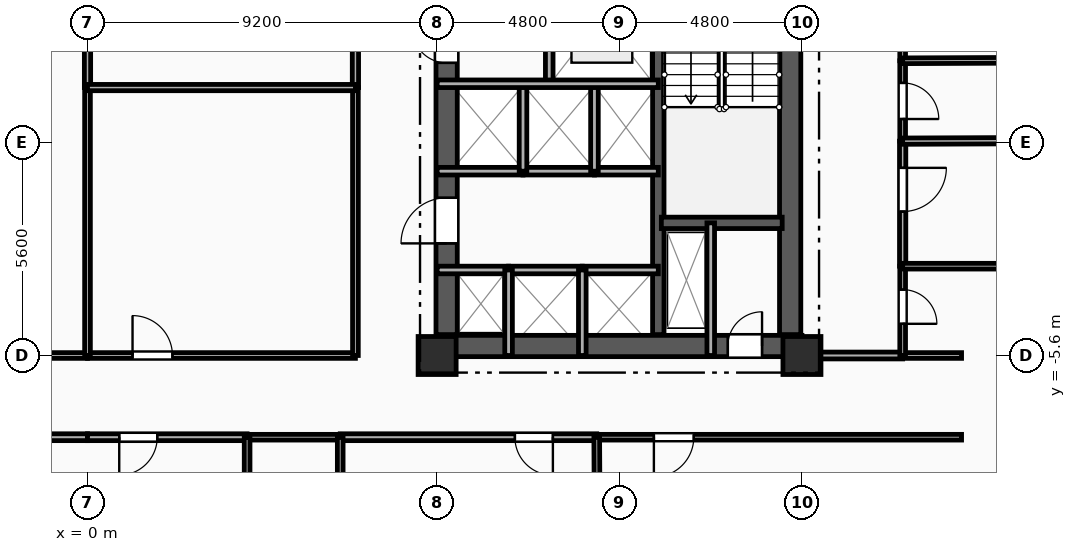
"""IFC4 building model, lengths in metres.
Left out: names, types, materials, properties, quantities, classifications, styles, units other than length and angle.
Written with IfcOpenShell. Run it as: python <this file> out.ifc"""

import sys

from ifc_helpers import new_model, si_unit, direction, frame, frame_2d, origin, origin_2d, place, context, subcontext, project, spatial, rectangle, extrude, element, fill, save


model = new_model("IFC4")
c1 = context("Model", 3, precision=1e-05, world=origin(), true_north=direction((0.0, 1.0)))
c2 = subcontext(c1, "Body", "Model", "MODEL_VIEW")
j1 = project(units=[si_unit("LENGTHUNIT", "METRE"), si_unit("PLANEANGLEUNIT", "RADIAN")], contexts=[c1])
p1 = place(None, origin())
s1 = spatial("IfcSite", under=j1, at=p1, CompositionType="ELEMENT")
p2 = place(p1, origin())
s2 = spatial("IfcBuilding", under=s1, at=p2, CompositionType="ELEMENT")
p3 = place(p2, frame((0.0, 0.0, 82.35)))
s3 = spatial("IfcBuildingStorey", under=s2, at=p3, CompositionType="ELEMENT", Elevation=82.35)
for number, where, z_axis, x_axis in (
    (1, (9.2, -5.6, 0.0), (0.0, 0.0, 1.0), (1.0, 0.0, 0.0)),
    (2, (18.8, -5.6, 0.0), (0.0, 0.0, 1.0), (1.0, 0.0, 0.0)),
):
    element("IfcColumn", number, at=place(p3, frame(where, z_axis=z_axis, x_axis=x_axis)), inside=s3, PredefinedType="COLUMN", context=c2, shape_type="SweptSolid", body=[
        extrude(rectangle(XDim=1.0, YDim=1.0, at=origin_2d()), origin(), (0.0, 0.0, 1.0), 3.35),
    ])
p4 = place(p3, frame((9.2, -5.35, 0.0), z_axis=(0.0, 0.0, 1.0), x_axis=(1.0, 0.0, 0.0)))
e3 = element("IfcWall", 3, at=p4, inside=s3, PredefinedType="SHEAR", context=c2, shape_type="SweptSolid", body=[
    extrude(rectangle(XDim=9.6, YDim=0.56, at=frame_2d((4.8, 0.0))), origin(), (0.0, 0.0, 1.0), 3.045),
])
p5 = place(p4, frame((7.65, 0.0, 0.0)))
e4 = element("IfcOpeningElement", 4, at=p5, cuts=e3, PredefinedType="OPENING", context=c2, shape_type="SweptSolid", body=[
    extrude(rectangle(XDim=0.9, YDim=2.1, at=frame_2d((0.45, 1.05))), frame((0.0, 0.29, 0.0), z_axis=(0.0, -1.0, 0.0), x_axis=(1.0, 0.0, 0.0)), (0.0, 0.0, 1.0), 0.58),
])
p6 = place(p3, frame((9.45, -5.05, 0.0), z_axis=(0.0, 0.0, 1.0), x_axis=(0.0, 1.0, 0.0)))
e5 = element("IfcWall", 5, at=p6, inside=s3, PredefinedType="SHEAR", context=c2, shape_type="SweptSolid", body=[
    extrude(rectangle(XDim=10.1, YDim=0.56, at=frame_2d((5.05, 0.0))), origin(), (0.0, 0.0, 1.0), 3.045),
])
p7 = place(p6, frame((7.15, 0.0, 0.0)))
e6 = element("IfcOpeningElement", 6, at=p7, cuts=e5, PredefinedType="OPENING", context=c2, shape_type="SweptSolid", body=[
    extrude(rectangle(XDim=0.9, YDim=2.1, at=frame_2d((0.45, 1.05))), frame((0.0, 0.29, 0.0), z_axis=(0.0, -1.0, 0.0), x_axis=(1.0, 0.0, 0.0)), (0.0, 0.0, 1.0), 0.58),
])
p8 = place(p6, frame((2.4, 0.0, 0.0)))
e7 = element("IfcOpeningElement", 7, at=p8, cuts=e5, PredefinedType="OPENING", context=c2, shape_type="SweptSolid", body=[
    extrude(rectangle(XDim=1.2, YDim=2.15, at=frame_2d((0.6, 1.075))), frame((0.0, 0.29, 0.0), z_axis=(0.0, -1.0, 0.0), x_axis=(1.0, 0.0, 0.0)), (0.0, 0.0, 1.0), 0.58),
])
p9 = place(p3, frame((18.49, -5.05, 0.0), z_axis=(0.0, 0.0, 1.0), x_axis=(0.0, 1.0, 0.0)))
e8 = element("IfcWall", 8, at=p9, inside=s3, PredefinedType="SHEAR", context=c2, shape_type="SweptSolid", body=[
    extrude(rectangle(XDim=10.1, YDim=0.56, at=frame_2d((5.05, 0.0))), origin(), (0.0, 0.0, 1.0), 3.045),
])
p10 = place(p3, frame((15.02, -5.05, 0.0), z_axis=(0.0, 0.0, 1.0), x_axis=(0.0, 1.0, 0.0)))
e9 = element("IfcWall", 9, at=p10, inside=s3, PredefinedType="SHEAR", context=c2, shape_type="SweptSolid", body=[
    extrude(rectangle(XDim=10.1, YDim=0.3, at=frame_2d((5.05, 0.0))), origin(), (0.0, 0.0, 1.0), 3.045),
])
p11 = place(p3, frame((15.1, -2.11, 0.0), z_axis=(0.0, 0.0, 1.0), x_axis=(1.0, 0.0, 0.0)))
e10 = element("IfcWall", 10, at=p11, inside=s3, PredefinedType="SHEAR", context=c2, shape_type="SweptSolid", body=[
    extrude(rectangle(XDim=3.18, YDim=0.3, at=frame_2d((1.59, 0.0))), origin(), (0.0, 0.0, 1.0), 3.045),
])
p12 = place(p3, frame((16.4, -2.11, 0.0), z_axis=(0.0, 0.0, 1.0), x_axis=(0.0, -1.0, 0.0)))
e11 = element("IfcWall", 11, at=p12, inside=s3, PredefinedType="PARTITIONING", context=c2, shape_type="SweptSolid", body=[
    extrude(rectangle(XDim=3.49, YDim=0.2, at=frame_2d((1.745, 0.0))), origin(), (0.0, 0.0, 1.0), 3.045),
])
p13 = place(p3, frame((12.15, 5.6, 0.0), z_axis=(0.0, 0.0, 1.0), x_axis=(0.0, -1.0, 0.0)))
e12 = element("IfcWall", 12, at=p13, inside=s3, PredefinedType="PARTITIONING", context=c2, shape_type="SweptSolid", body=[
    extrude(rectangle(XDim=4.05, YDim=0.2, at=frame_2d((2.025, 0.0))), origin(), (0.0, 0.0, 1.0), 3.045),
])
p14 = place(p3, frame((9.2, -3.35, 0.0), z_axis=(0.0, 0.0, 1.0), x_axis=(1.0, 0.0, 0.0)))
e13 = element("IfcWall", 13, at=p14, inside=s3, PredefinedType="PARTITIONING", context=c2, shape_type="SweptSolid", body=[
    extrude(rectangle(XDim=1.88, YDim=0.2, at=frame_2d((0.94, 0.0))), origin(), (0.0, 0.0, 1.0), 2.76),
])
p15 = place(p3, frame((11.08, -3.35, 0.0), z_axis=(0.0, 0.0, 1.0), x_axis=(1.0, 0.0, 0.0)))
e14 = element("IfcWall", 14, at=p15, inside=s3, PredefinedType="PARTITIONING", context=c2, shape_type="SweptSolid", body=[
    extrude(rectangle(XDim=1.94, YDim=0.2, at=frame_2d((0.97, 0.0))), origin(), (0.0, 0.0, 1.0), 3.045),
])
p16 = place(p3, frame((13.02, -3.35, 0.0), z_axis=(0.0, 0.0, 1.0), x_axis=(1.0, 0.0, 0.0)))
e15 = element("IfcWall", 15, at=p16, inside=s3, PredefinedType="PARTITIONING", context=c2, shape_type="SweptSolid", body=[
    extrude(rectangle(XDim=2.0, YDim=0.2, at=frame_2d((1.0, 0.0))), origin(), (0.0, 0.0, 1.0), 3.045),
])
p17 = place(p3, frame((11.46, -0.75, 0.0), z_axis=(0.0, 0.0, 1.0), x_axis=(-1.0, 0.0, 0.0)))
e16 = element("IfcWall", 16, at=p17, inside=s3, PredefinedType="PARTITIONING", context=c2, shape_type="SweptSolid", body=[
    extrude(rectangle(XDim=2.26, YDim=0.2, at=frame_2d((1.13, 0.0))), origin(), (0.0, 0.0, 1.0), 3.045),
])
p18 = place(p3, frame((13.34, -0.75, 0.0), z_axis=(0.0, 0.0, 1.0), x_axis=(-1.0, 0.0, 0.0)))
e17 = element("IfcWall", 17, at=p18, inside=s3, PredefinedType="PARTITIONING", context=c2, shape_type="SweptSolid", body=[
    extrude(rectangle(XDim=1.88, YDim=0.2, at=frame_2d((0.94, 0.0))), origin(), (0.0, 0.0, 1.0), 3.045),
])
p19 = place(p3, frame((15.02, -0.75, 0.0), z_axis=(0.0, 0.0, 1.0), x_axis=(-1.0, 0.0, 0.0)))
e18 = element("IfcWall", 18, at=p19, inside=s3, PredefinedType="PARTITIONING", context=c2, shape_type="SweptSolid", body=[
    extrude(rectangle(XDim=1.68, YDim=0.2, at=frame_2d((0.84, 0.0))), origin(), (0.0, 0.0, 1.0), 3.045),
])
for number, where, z_axis, x_axis in (
    (19, (11.08, -5.6, 0.0), (0.0, 0.0, 1.0), (0.0, 1.0, 0.0)),
    (20, (13.02, -5.6, 0.0), (0.0, 0.0, 1.0), (0.0, 1.0, 0.0)),
):
    element("IfcWall", number, at=place(p3, frame(where, z_axis=z_axis, x_axis=x_axis)), inside=s3, PredefinedType="PARTITIONING", context=c2, shape_type="SweptSolid", body=[
        extrude(rectangle(XDim=2.25, YDim=0.2, at=frame_2d((1.125, 0.0))), origin(), (0.0, 0.0, 1.0), 3.045),
    ])
for number, where, z_axis, x_axis in (
    (21, (11.46, -0.75, 0.0), (0.0, 0.0, 1.0), (0.0, 1.0, 0.0)),
    (22, (13.34, -0.75, 0.0), (0.0, 0.0, 1.0), (0.0, 1.0, 0.0)),
):
    element("IfcWall", number, at=place(p3, frame(where, z_axis=z_axis, x_axis=x_axis)), inside=s3, PredefinedType="PARTITIONING", context=c2, shape_type="SweptSolid", body=[
        extrude(rectangle(XDim=2.3, YDim=0.2, at=frame_2d((1.15, 0.0))), origin(), (0.0, 0.0, 1.0), 3.045),
    ])
p20 = place(p3, frame((0.0, -7.75, 0.0), z_axis=(0.0, 0.0, 1.0), x_axis=(-1.0, 0.0, 0.0)))
e23 = element("IfcWall", 23, at=p20, inside=s3, PredefinedType="PARTITIONING", context=c2, shape_type="SweptSolid", body=[
    extrude(rectangle(XDim=2.55, YDim=0.18, at=frame_2d((1.275, 0.0))), origin(), (0.0, 0.0, 1.0), 3.045),
])
p21 = place(p3, frame((-7.05, -5.6, 0.0), z_axis=(0.0, 0.0, 1.0), x_axis=(1.0, 0.0, 0.0)))
e24 = element("IfcWall", 24, at=p21, inside=s3, PredefinedType="PARTITIONING", context=c2, shape_type="SweptSolid", body=[
    extrude(rectangle(XDim=7.05, YDim=0.15, at=frame_2d((3.525, 0.0))), origin(), (0.0, 0.0, 1.0), 2.53),
])
p22 = place(p3, frame((18.8, -5.6, 0.0), z_axis=(0.0, 0.0, 1.0), x_axis=(1.0, 0.0, 0.0)))
e25 = element("IfcWall", 25, at=p22, inside=s3, PredefinedType="PARTITIONING", context=c2, shape_type="SweptSolid", body=[
    extrude(rectangle(XDim=2.65, YDim=0.18, at=frame_2d((1.325, 0.0))), origin(), (0.0, 0.0, 1.0), 2.53),
])
p23 = place(p3, frame((21.45, -5.6, 0.0), z_axis=(0.0, 0.0, 1.0), x_axis=(1.0, 0.0, 0.0)))
e26 = element("IfcWall", 26, at=p23, inside=s3, PredefinedType="PLUMBINGWALL", context=c2, shape_type="SweptSolid", body=[
    extrude(rectangle(XDim=1.55, YDim=0.15, at=frame_2d((0.775, 0.0))), origin(), (0.0, 0.0, 1.0), 3.045),
])
p24 = place(p3, frame((4.2, -7.75, 0.0), z_axis=(0.0, 0.0, 1.0), x_axis=(-1.0, 0.0, 0.0)))
e27 = element("IfcWall", 27, at=p24, inside=s3, PredefinedType="PARTITIONING", context=c2, shape_type="SweptSolid", body=[
    extrude(rectangle(XDim=4.2, YDim=0.18, at=frame_2d((2.1, 0.0))), origin(), (0.0, 0.0, 1.0), 3.045),
])
p25 = place(p24, frame((2.365, 0.0, 0.0)))
e28 = element("IfcOpeningElement", 28, at=p25, cuts=e27, PredefinedType="OPENING", context=c2, shape_type="SweptSolid", body=[
    extrude(rectangle(XDim=1.0, YDim=2.15, at=frame_2d((0.5, 1.075))), frame((0.0, 0.1, 0.0), z_axis=(0.0, -1.0, 0.0), x_axis=(1.0, 0.0, 0.0)), (0.0, 0.0, 1.0), 0.2),
])
p26 = place(p3, frame((13.4, -7.75, 0.0), z_axis=(0.0, 0.0, 1.0), x_axis=(-1.0, 0.0, 0.0)))
e29 = element("IfcWall", 29, at=p26, inside=s3, PredefinedType="PARTITIONING", context=c2, shape_type="SweptSolid", body=[
    extrude(rectangle(XDim=6.75, YDim=0.18, at=frame_2d((3.375, 0.0))), origin(), (0.0, 0.0, 1.0), 3.045),
])
p27 = place(p26, frame((1.154, 0.0, 0.0)))
e30 = element("IfcOpeningElement", 30, at=p27, cuts=e29, PredefinedType="OPENING", context=c2, shape_type="SweptSolid", body=[
    extrude(rectangle(XDim=1.0, YDim=2.15, at=frame_2d((0.5, 1.075))), frame((0.0, 0.1, 0.0), z_axis=(0.0, -1.0, 0.0), x_axis=(1.0, 0.0, 0.0)), (0.0, 0.0, 1.0), 0.2),
])
p28 = place(p3, frame((6.65, -7.75, 0.0), z_axis=(0.0, 0.0, 1.0), x_axis=(-1.0, 0.0, 0.0)))
e31 = element("IfcWall", 31, at=p28, inside=s3, PredefinedType="PLUMBINGWALL", context=c2, shape_type="SweptSolid", body=[
    extrude(rectangle(XDim=2.45, YDim=0.15, at=frame_2d((1.225, 0.0))), origin(), (0.0, 0.0, 1.0), 3.045),
])
p29 = place(p3, frame((23.0, -7.75, 0.0), z_axis=(0.0, 0.0, 1.0), x_axis=(-1.0, 0.0, 0.0)))
e32 = element("IfcWall", 32, at=p29, inside=s3, PredefinedType="PARTITIONING", context=c2, shape_type="SweptSolid", body=[
    extrude(rectangle(XDim=9.6, YDim=0.15, at=frame_2d((4.8, 0.0))), origin(), (0.0, 0.0, 1.0), 3.045),
])
p30 = place(p29, frame((7.046, 0.0, 0.0)))
e33 = element("IfcOpeningElement", 33, at=p30, cuts=e32, PredefinedType="OPENING", context=c2, shape_type="SweptSolid", body=[
    extrude(rectangle(XDim=1.05, YDim=2.15, at=frame_2d((0.525, 1.075))), frame((0.0, 0.085, 0.0), z_axis=(0.0, -1.0, 0.0), x_axis=(1.0, 0.0, 0.0)), (0.0, 0.0, 1.0), 0.17),
])
p31 = place(p3, frame((0.0, -5.6, 0.0), z_axis=(0.0, 0.0, 1.0), x_axis=(1.0, 0.0, 0.0)))
e34 = element("IfcWall", 34, at=p31, inside=s3, PredefinedType="PARTITIONING", context=c2, shape_type="SweptSolid", body=[
    extrude(rectangle(XDim=7.05, YDim=0.15, at=frame_2d((3.525, 0.0))), origin(), (0.0, 0.0, 1.0), 2.53),
])
p32 = place(p31, frame((1.185, 0.0, 0.0)))
e35 = element("IfcOpeningElement", 35, at=p32, cuts=e34, PredefinedType="OPENING", context=c2, shape_type="SweptSolid", body=[
    extrude(rectangle(XDim=1.05, YDim=2.15, at=frame_2d((0.525, 1.075))), frame((0.0, 0.085, 0.0), z_axis=(0.0, -1.0, 0.0), x_axis=(1.0, 0.0, 0.0)), (0.0, 0.0, 1.0), 0.17),
])
p33 = place(p3, frame((7.05, -5.6, 0.0), z_axis=(0.0, 0.0, 1.0), x_axis=(0.0, 1.0, 0.0)))
e36 = element("IfcWall", 36, at=p33, inside=s3, PredefinedType="PARTITIONING", context=c2, shape_type="SweptSolid", body=[
    extrude(rectangle(XDim=7.05, YDim=0.15, at=frame_2d((3.525, 0.0))), origin(), (0.0, 0.0, 1.0), 3.045),
])
p34 = place(p3, frame((7.05, 1.45, 0.0), z_axis=(0.0, 0.0, 1.0), x_axis=(0.0, 1.0, 0.0)))
e37 = element("IfcWall", 37, at=p34, inside=s3, PredefinedType="PARTITIONING", context=c2, shape_type="SweptSolid", body=[
    extrude(rectangle(XDim=7.05, YDim=0.165, at=frame_2d((3.525, 0.0))), origin(), (0.0, 0.0, 1.0), 3.045),
])
p35 = place(p3, frame((21.45, -3.25, 0.0), z_axis=(0.0, 0.0, 1.0), x_axis=(0.0, -1.0, 0.0)))
e38 = element("IfcWall", 38, at=p35, inside=s3, PredefinedType="PLUMBINGWALL", context=c2, shape_type="SweptSolid", body=[
    extrude(rectangle(XDim=2.35, YDim=0.15, at=frame_2d((1.175, 0.0))), origin(), (0.0, 0.0, 1.0), 3.045),
])
p36 = place(p35, frame((0.616, 0.0, 0.0)))
e39 = element("IfcOpeningElement", 39, at=p36, cuts=e38, PredefinedType="OPENING", context=c2, shape_type="SweptSolid", body=[
    extrude(rectangle(XDim=0.9, YDim=2.1, at=frame_2d((0.45, 1.05))), frame((0.0, 0.085, 0.0), z_axis=(0.0, -1.0, 0.0), x_axis=(1.0, 0.0, 0.0)), (0.0, 0.0, 1.0), 0.17),
])
p37 = place(p3, frame((21.45, 0.04, 0.0), z_axis=(0.0, 0.0, 1.0), x_axis=(0.0, -1.0, 0.0)))
e40 = element("IfcWall", 40, at=p37, inside=s3, PredefinedType="PARTITIONING", context=c2, shape_type="SweptSolid", body=[
    extrude(rectangle(XDim=3.29, YDim=0.165, at=frame_2d((1.645, 0.0))), origin(), (0.0, 0.0, 1.0), 3.045),
])
p38 = place(p37, frame((0.702, 0.0, 0.0)))
e41 = element("IfcOpeningElement", 41, at=p38, cuts=e40, PredefinedType="OPENING", context=c2, shape_type="SweptSolid", body=[
    extrude(rectangle(XDim=1.15, YDim=2.15, at=frame_2d((0.575, 1.075))), frame((0.0, 0.093, 0.0), z_axis=(0.0, -1.0, 0.0), x_axis=(1.0, 0.0, 0.0)), (0.0, 0.0, 1.0), 0.185),
])
p39 = place(p3, frame((21.45, 2.155, 0.0), z_axis=(0.0, 0.0, 1.0), x_axis=(0.0, -1.0, 0.0)))
e42 = element("IfcWall", 42, at=p39, inside=s3, PredefinedType="PARTITIONING", context=c2, shape_type="SweptSolid", body=[
    extrude(rectangle(XDim=2.115, YDim=0.15, at=frame_2d((1.058, 0.0))), origin(), (0.0, 0.0, 1.0), 3.045),
])
p40 = place(p39, frame((0.583, 0.0, 0.0)))
e43 = element("IfcOpeningElement", 43, at=p40, cuts=e42, PredefinedType="OPENING", context=c2, shape_type="SweptSolid", body=[
    extrude(rectangle(XDim=0.95, YDim=2.1, at=frame_2d((0.475, 1.05))), frame((0.0, 0.085, 0.0), z_axis=(0.0, -1.0, 0.0), x_axis=(1.0, 0.0, 0.0)), (0.0, 0.0, 1.0), 0.17),
])
p41 = place(p3, frame((21.45, 4.27, 0.0), z_axis=(0.0, 0.0, 1.0), x_axis=(0.0, -1.0, 0.0)))
e44 = element("IfcWall", 44, at=p41, inside=s3, PredefinedType="PARTITIONING", context=c2, shape_type="SweptSolid", body=[
    extrude(rectangle(XDim=2.115, YDim=0.15, at=frame_2d((1.058, 0.0))), origin(), (0.0, 0.0, 1.0), 3.045),
])
p42 = place(p41, frame((0.583, 0.0, 0.0)))
e45 = element("IfcOpeningElement", 45, at=p42, cuts=e44, PredefinedType="OPENING", context=c2, shape_type="SweptSolid", body=[
    extrude(rectangle(XDim=0.95, YDim=2.1, at=frame_2d((0.475, 1.05))), frame((0.0, 0.085, 0.0), z_axis=(0.0, -1.0, 0.0), x_axis=(1.0, 0.0, 0.0)), (0.0, 0.0, 1.0), 0.17),
])
p43 = place(p3, frame((21.45, -3.25, 0.0), z_axis=(0.0, 0.0, 1.0), x_axis=(1.0, 0.0, 0.0)))
e46 = element("IfcWall", 46, at=p43, inside=s3, PredefinedType="PLUMBINGWALL", context=c2, shape_type="SweptSolid", body=[
    extrude(rectangle(XDim=3.2, YDim=0.15, at=frame_2d((1.6, 0.0))), origin(), (0.0, 0.0, 1.0), 3.045),
])
p44 = place(p3, frame((21.45, 0.04, 0.0), z_axis=(0.0, 0.0, 1.0), x_axis=(0.999991717636, 0.004069970361, 0.0)))
e47 = element("IfcWall", 47, at=p44, inside=s3, PredefinedType="PARTITIONING", context=c2, shape_type="SweptSolid", body=[
    extrude(rectangle(XDim=10.797, YDim=0.165, at=frame_2d((5.399, 0.0))), origin(), (0.0, 0.0, 1.0), 2.53),
])
p45 = place(p3, frame((21.45, 2.155, 0.0), z_axis=(0.0, 0.0, 1.0), x_axis=(0.999991365588, 0.004155568413, 0.0)))
e48 = element("IfcWall", 48, at=p45, inside=s3, PredefinedType="PARTITIONING", context=c2, shape_type="SweptSolid", body=[
    extrude(rectangle(XDim=10.575, YDim=0.15, at=frame_2d((5.288, 0.0))), origin(), (0.0, 0.0, 1.0), 3.045),
])
for number, where, z_axis, x_axis in (
    (49, (4.2, -7.75, 0.0), (0.0, 0.0, 1.0), (0.0, -1.0, 0.0)),
    (50, (6.65, -9.9, 0.0), (0.0, 0.0, 1.0), (0.0, 1.0, 0.0)),
):
    element("IfcWall", number, at=place(p3, frame(where, z_axis=z_axis, x_axis=x_axis)), inside=s3, PredefinedType="PLUMBINGWALL", context=c2, shape_type="SweptSolid", body=[
        extrude(rectangle(XDim=2.15, YDim=0.15, at=frame_2d((1.075, 0.0))), origin(), (0.0, 0.0, 1.0), 3.045),
    ])
p46 = place(p3, frame((13.4, -7.75, 0.0), z_axis=(0.0, 0.0, 1.0), x_axis=(0.005487554946, -0.999984943257, 0.0)))
e51 = element("IfcWall", 51, at=p46, inside=s3, PredefinedType="PARTITIONING", context=c2, shape_type="SweptSolid", body=[
    extrude(rectangle(XDim=8.008, YDim=0.15, at=frame_2d((4.004, 0.0))), origin(), (0.0, 0.0, 1.0), 3.045),
])
p47 = place(p3, frame((0.0, 1.45, 0.0), z_axis=(0.0, 0.0, 1.0), x_axis=(0.0, -1.0, 0.0)))
e52 = element("IfcWall", 52, at=p47, inside=s3, PredefinedType="PARTITIONING", context=c2, shape_type="SweptSolid", body=[
    extrude(rectangle(XDim=7.05, YDim=0.15, at=frame_2d((3.525, 0.0))), origin(), (0.0, 0.0, 1.0), 3.045),
])
for number, where, z_axis, x_axis in (
    (53, (0.0, 8.5, 0.0), (0.0, 0.0, 1.0), (0.0, -1.0, 0.0)),
    (54, (0.0, 1.45, 0.0), (0.0, 0.0, 1.0), (1.0, 0.0, 0.0)),
):
    element("IfcWall", number, at=place(p3, frame(where, z_axis=z_axis, x_axis=x_axis)), inside=s3, PredefinedType="PARTITIONING", context=c2, shape_type="SweptSolid", body=[
        extrude(rectangle(XDim=7.05, YDim=0.165, at=frame_2d((3.525, 0.0))), origin(), (0.0, 0.0, 1.0), 3.045),
    ])
p48 = place(p3, frame((9.2, 1.55, 0.0), z_axis=(0.0, 0.0, 1.0), x_axis=(1.0, 0.0, 0.0)))
e55 = element("IfcWall", 55, at=p48, inside=s3, PredefinedType="PARTITIONING", context=c2, shape_type="SweptSolid", body=[
    extrude(rectangle(XDim=5.82, YDim=0.2, at=frame_2d((2.91, 0.0))), origin(), (0.0, 0.0, 1.0), 3.045),
])
p49 = place(p5, origin())
e56 = element("IfcDoor", 56, at=p49, inside=s3, OperationType="SINGLE_SWING_RIGHT", PredefinedType="DOOR", context=c2, shape_type="SweptSolid", body=[
    extrude(rectangle(XDim=0.9, YDim=2.1, at=frame_2d((0.45, 1.05))), frame((0.0, 0.025, 0.0), z_axis=(0.0, -1.0, 0.0), x_axis=(1.0, 0.0, 0.0)), (0.0, 0.0, 1.0), 0.05),
])
fill(e4, e56)
p50 = place(p7, origin())
e57 = element("IfcDoor", 57, at=p50, inside=s3, OperationType="SINGLE_SWING_RIGHT", PredefinedType="DOOR", context=c2, shape_type="SweptSolid", body=[
    extrude(rectangle(XDim=0.9, YDim=2.1, at=frame_2d((0.45, 1.05))), frame((0.0, 0.025, 0.0), z_axis=(0.0, -1.0, 0.0), x_axis=(1.0, 0.0, 0.0)), (0.0, 0.0, 1.0), 0.05),
])
fill(e6, e57)
p51 = place(p8, origin())
e58 = element("IfcDoor", 58, at=p51, inside=s3, OperationType="SINGLE_SWING_LEFT", PredefinedType="DOOR", context=c2, shape_type="SweptSolid", body=[
    extrude(rectangle(XDim=1.2, YDim=2.15, at=frame_2d((0.6, 1.075))), frame((0.0, 0.025, 0.0), z_axis=(0.0, -1.0, 0.0), x_axis=(1.0, 0.0, 0.0)), (0.0, 0.0, 1.0), 0.05),
])
fill(e7, e58)
p52 = place(p25, origin())
e59 = element("IfcDoor", 59, at=p52, inside=s3, OperationType="SINGLE_SWING_RIGHT", PredefinedType="DOOR", context=c2, shape_type="SweptSolid", body=[
    extrude(rectangle(XDim=1.0, YDim=2.15, at=frame_2d((0.5, 1.075))), frame((0.0, 0.025, 0.0), z_axis=(0.0, -1.0, 0.0), x_axis=(1.0, 0.0, 0.0)), (0.0, 0.0, 1.0), 0.05),
])
fill(e28, e59)
p53 = place(p27, origin())
e60 = element("IfcDoor", 60, at=p53, inside=s3, OperationType="SINGLE_SWING_LEFT", PredefinedType="DOOR", context=c2, shape_type="SweptSolid", body=[
    extrude(rectangle(XDim=1.0, YDim=2.15, at=frame_2d((0.5, 1.075))), frame((0.0, 0.025, 0.0), z_axis=(0.0, -1.0, 0.0), x_axis=(1.0, 0.0, 0.0)), (0.0, 0.0, 1.0), 0.05),
])
fill(e30, e60)
p54 = place(p30, origin())
e61 = element("IfcDoor", 61, at=p54, inside=s3, OperationType="SINGLE_SWING_RIGHT", PredefinedType="DOOR", context=c2, shape_type="SweptSolid", body=[
    extrude(rectangle(XDim=1.05, YDim=2.15, at=frame_2d((0.525, 1.075))), frame((0.0, 0.025, 0.0), z_axis=(0.0, -1.0, 0.0), x_axis=(1.0, 0.0, 0.0)), (0.0, 0.0, 1.0), 0.05),
])
fill(e33, e61)
p55 = place(p32, origin())
e62 = element("IfcDoor", 62, at=p55, inside=s3, OperationType="SINGLE_SWING_LEFT", PredefinedType="DOOR", context=c2, shape_type="SweptSolid", body=[
    extrude(rectangle(XDim=1.05, YDim=2.15, at=frame_2d((0.525, 1.075))), frame((0.0, 0.025, 0.0), z_axis=(0.0, -1.0, 0.0), x_axis=(1.0, 0.0, 0.0)), (0.0, 0.0, 1.0), 0.05),
])
fill(e35, e62)
p56 = place(p36, origin())
e63 = element("IfcDoor", 63, at=p56, inside=s3, OperationType="SINGLE_SWING_RIGHT", PredefinedType="DOOR", context=c2, shape_type="SweptSolid", body=[
    extrude(rectangle(XDim=0.9, YDim=2.1, at=frame_2d((0.45, 1.05))), frame((0.0, 0.025, 0.0), z_axis=(0.0, -1.0, 0.0), x_axis=(1.0, 0.0, 0.0)), (0.0, 0.0, 1.0), 0.05),
])
fill(e39, e63)
p57 = place(p38, origin())
e64 = element("IfcDoor", 64, at=p57, inside=s3, OperationType="SINGLE_SWING_LEFT", PredefinedType="DOOR", context=c2, shape_type="SweptSolid", body=[
    extrude(rectangle(XDim=1.15, YDim=2.15, at=frame_2d((0.575, 1.075))), frame((0.0, 0.025, 0.0), z_axis=(0.0, -1.0, 0.0), x_axis=(1.0, 0.0, 0.0)), (0.0, 0.0, 1.0), 0.05),
])
fill(e41, e64)
p58 = place(p40, origin())
e65 = element("IfcDoor", 65, at=p58, inside=s3, OperationType="SINGLE_SWING_RIGHT", PredefinedType="DOOR", context=c2, shape_type="SweptSolid", body=[
    extrude(rectangle(XDim=0.95, YDim=2.1, at=frame_2d((0.475, 1.05))), frame((0.0, 0.025, 0.0), z_axis=(0.0, -1.0, 0.0), x_axis=(1.0, 0.0, 0.0)), (0.0, 0.0, 1.0), 0.05),
])
fill(e43, e65)
save(model, sys.argv[1])
